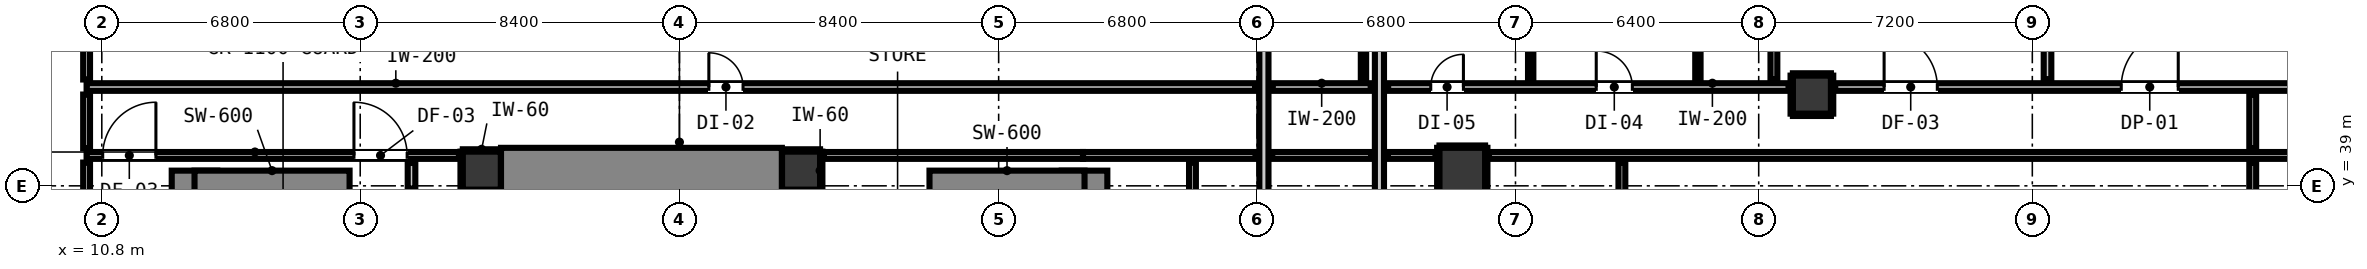
"""IFC4 building model, lengths in metres.
Left out: names, types, materials, properties, quantities, classifications, styles, units other than length and angle.
Written with IfcOpenShell. Run it as: python <this file> out.ifc"""

import sys

from ifc_helpers import new_model, si_unit, direction, frame, frame_2d, origin, origin_2d, place, context, subcontext, project, spatial, rectangle, circle, extrude, element, fill, save


model = new_model("IFC4")
c1 = context("Model", 3, precision=1e-05, world=origin(), true_north=direction((0.0, 1.0)))
c2 = subcontext(c1, "Body", "Model", "MODEL_VIEW")
j1 = project(units=[si_unit("LENGTHUNIT", "METRE"), si_unit("PLANEANGLEUNIT", "RADIAN")], contexts=[c1])
p1 = place(None, origin())
s1 = spatial("IfcSite", under=j1, at=p1, CompositionType="ELEMENT")
p2 = place(p1, origin())
s2 = spatial("IfcBuilding", under=s1, at=p2, CompositionType="ELEMENT")
p3 = place(p2, frame((0.0, 0.0, -4.4)))
s3 = spatial("IfcBuildingStorey", under=s2, at=p3, CompositionType="ELEMENT", Elevation=-4.4)
for number, where, z_axis, x_axis in (
    (1, (20.8, 39.4, 0.0), (0.0, 0.0, 1.0), (1.0, 0.0, 0.0)),
    (2, (29.2, 39.4, 0.0), (0.0, 0.0, 1.0), (1.0, 0.0, 0.0)),
):
    element("IfcColumn", number, at=place(p3, frame(where, z_axis=z_axis, x_axis=x_axis)), inside=s3, PredefinedType="COLUMN", context=c2, shape_type="SweptSolid", body=[
        extrude(rectangle(XDim=1.0, YDim=1.0, at=origin_2d()), origin(), (0.0, 0.0, 1.0), 4.4),
    ])
p4 = place(p3, frame((13.24, 31.205, 0.0), z_axis=(0.0, 0.0, 1.0), x_axis=(0.0, 1.0, 0.0)))
e3 = element("IfcWall", 3, at=p4, inside=s3, PredefinedType="SHEAR", context=c2, shape_type="SweptSolid", body=[
    extrude(rectangle(XDim=8.195, YDim=1.2, at=frame_2d((4.097, 0.0))), origin(), (0.0, 0.0, 1.0), 4.4),
])
p5 = place(p3, frame((13.24, 39.1, 0.0), z_axis=(0.0, 0.0, 1.0), x_axis=(1.0, 0.0, 0.0)))
e4 = element("IfcWall", 4, at=p5, inside=s3, PredefinedType="SHEAR", context=c2, shape_type="SweptSolid", body=[
    extrude(rectangle(XDim=4.08, YDim=0.6, at=frame_2d((2.04, 0.0))), origin(), (0.0, 0.0, 1.0), 4.4),
])
p6 = place(p3, frame((36.66, 31.205, 0.0), z_axis=(0.0, 0.0, 1.0), x_axis=(0.0, 1.0, 0.0)))
e5 = element("IfcWall", 5, at=p6, inside=s3, PredefinedType="SHEAR", context=c2, shape_type="SweptSolid", body=[
    extrude(rectangle(XDim=8.195, YDim=1.2, at=frame_2d((4.097, 0.0))), origin(), (0.0, 0.0, 1.0), 4.4),
])
p7 = place(p3, frame((32.58, 39.1, 0.0), z_axis=(0.0, 0.0, 1.0), x_axis=(1.0, 0.0, 0.0)))
e6 = element("IfcWall", 6, at=p7, inside=s3, PredefinedType="SHEAR", context=c2, shape_type="SweptSolid", body=[
    extrude(rectangle(XDim=4.08, YDim=0.6, at=frame_2d((2.04, 0.0))), origin(), (0.0, 0.0, 1.0), 4.4),
])
p8 = place(p3, frame((21.305, 39.4, 0.0), z_axis=(0.0, 0.0, 1.0), x_axis=(1.0, 0.0, 0.0)))
e7 = element("IfcWall", 7, at=p8, inside=s3, PredefinedType="SHEAR", context=c2, shape_type="SweptSolid", body=[
    extrude(rectangle(XDim=7.39, YDim=1.2, at=frame_2d((3.695, 0.0))), origin(), (0.0, 0.0, 1.0), 4.4),
])
p9 = place(p3, frame((46.6, 39.4, 0.0), z_axis=(0.0, 0.0, 1.0), x_axis=(1.0, 0.0, 0.0)))
e8 = element("IfcColumn", 8, at=p9, inside=s3, PredefinedType="COLUMN", context=c2, shape_type="SweptSolid", body=[
    extrude(circle(Radius=0.6, at=origin_2d()), origin(), (0.0, 0.0, 1.0), 4.4),
])
p10 = place(p3, frame((55.8, 41.4, 0.0), z_axis=(0.0, 0.0, 1.0), x_axis=(1.0, 0.0, 0.0)))
e9 = element("IfcColumn", 9, at=p10, inside=s3, PredefinedType="COLUMN", context=c2, shape_type="SweptSolid", body=[
    extrude(rectangle(XDim=1.0, YDim=1.0, at=origin_2d()), origin(), (0.0, 0.0, 1.0), 4.4),
])
for number, where, z_axis, x_axis in (
    (10, (41.38, 21.95, 0.0), (0.0, 0.0, 1.0), (0.0, 1.0, 0.0)),
    (11, (44.42, 21.95, 0.0), (0.0, 0.0, 1.0), (0.0, 1.0, 0.0)),
):
    element("IfcWall", number, at=place(p3, frame(where, z_axis=z_axis, x_axis=x_axis)), inside=s3, PredefinedType="PARAPET", context=c2, shape_type="SweptSolid", body=[
        extrude(rectangle(XDim=28.85, YDim=0.24, at=frame_2d((14.425, 0.0))), origin(), (0.0, 0.0, 1.0), 3.96),
    ])
p11 = place(p3, frame((10.4, 41.6, 0.0), z_axis=(0.0, 0.0, 1.0), x_axis=(1.0, 0.0, 0.0)))
e12 = element("IfcWall", 12, at=p11, inside=s3, PredefinedType="PARTITIONING", context=c2, shape_type="SweptSolid", body=[
    extrude(rectangle(XDim=30.752, YDim=0.2, at=frame_2d((15.376, 0.0))), origin(), (0.0, 0.0, 1.0), 3.98),
])
p12 = place(p11, frame((16.374, 0.0, 0.0)))
e13 = element("IfcOpeningElement", 13, at=p12, cuts=e12, PredefinedType="OPENING", context=c2, shape_type="SweptSolid", body=[
    extrude(rectangle(XDim=0.9, YDim=2.1, at=frame_2d((0.45, 1.05))), frame((0.0, 0.11, 0.0), z_axis=(0.0, -1.0, 0.0), x_axis=(1.0, 0.0, 0.0)), (0.0, 0.0, 1.0), 0.22),
])
p13 = place(p3, frame((41.608, 41.6, 0.0), z_axis=(0.0, 0.0, 1.0), x_axis=(1.0, 0.0, 0.0)))
e14 = element("IfcWall", 14, at=p13, inside=s3, PredefinedType="PARTITIONING", context=c2, shape_type="SweptSolid", body=[
    extrude(rectangle(XDim=2.584, YDim=0.2, at=frame_2d((1.292, 0.0))), origin(), (0.0, 0.0, 1.0), 3.98),
])
p14 = place(p3, frame((44.648, 41.6, 0.0), z_axis=(0.0, 0.0, 1.0), x_axis=(1.0, 0.0, 0.0)))
e15 = element("IfcWall", 15, at=p14, inside=s3, PredefinedType="PARTITIONING", context=c2, shape_type="SweptSolid", body=[
    extrude(rectangle(XDim=10.54, YDim=0.2, at=frame_2d((5.27, 0.0))), origin(), (0.0, 0.0, 1.0), 3.98),
])
p15 = place(p14, frame((1.122, 0.0, 0.0)))
e16 = element("IfcOpeningElement", 16, at=p15, cuts=e15, PredefinedType="OPENING", context=c2, shape_type="SweptSolid", body=[
    extrude(rectangle(XDim=0.86, YDim=2.02, at=frame_2d((0.43, 1.01))), frame((0.0, 0.11, 0.0), z_axis=(0.0, -1.0, 0.0), x_axis=(1.0, 0.0, 0.0)), (0.0, 0.0, 1.0), 0.22),
])
p16 = place(p14, frame((5.477, 0.0, 0.0)))
e17 = element("IfcOpeningElement", 17, at=p16, cuts=e15, PredefinedType="OPENING", context=c2, shape_type="SweptSolid", body=[
    extrude(rectangle(XDim=0.95, YDim=2.1, at=frame_2d((0.475, 1.05))), frame((0.0, 0.11, 0.0), z_axis=(0.0, -1.0, 0.0), x_axis=(1.0, 0.0, 0.0)), (0.0, 0.0, 1.0), 0.22),
])
p17 = place(p3, frame((56.412, 41.6, 0.0), z_axis=(0.0, 0.0, 1.0), x_axis=(1.0, 0.0, 0.0)))
e18 = element("IfcWall", 18, at=p17, inside=s3, PredefinedType="PARTITIONING", context=c2, shape_type="SweptSolid", body=[
    extrude(rectangle(XDim=24.776, YDim=0.2, at=frame_2d((12.388, 0.0))), origin(), (0.0, 0.0, 1.0), 3.153),
])
p18 = place(p17, frame((1.288, 0.0, 0.0)))
e19 = element("IfcOpeningElement", 19, at=p18, cuts=e18, PredefinedType="OPENING", context=c2, shape_type="SweptSolid", body=[
    extrude(rectangle(XDim=1.4, YDim=2.15, at=frame_2d((0.7, 1.075))), frame((0.0, 0.11, 0.0), z_axis=(0.0, -1.0, 0.0), x_axis=(1.0, 0.0, 0.0)), (0.0, 0.0, 1.0), 0.22),
])
p19 = place(p17, frame((7.528, 0.0, 0.0)))
e20 = element("IfcOpeningElement", 20, at=p19, cuts=e18, PredefinedType="OPENING", context=c2, shape_type="SweptSolid", body=[
    extrude(rectangle(XDim=1.5, YDim=2.15, at=frame_2d((0.75, 1.075))), frame((0.0, 0.11, 0.0), z_axis=(0.0, -1.0, 0.0), x_axis=(1.0, 0.0, 0.0)), (0.0, 0.0, 1.0), 0.22),
])
p20 = place(p3, frame((10.4, 39.8, 0.0), z_axis=(0.0, 0.0, 1.0), x_axis=(1.0, 0.0, 0.0)))
e21 = element("IfcWall", 21, at=p20, inside=s3, PredefinedType="PARTITIONING", context=c2, shape_type="SweptSolid", body=[
    extrude(rectangle(XDim=9.798, YDim=0.18, at=frame_2d((4.899, 0.0))), origin(), (0.0, 0.0, 1.0), 3.215),
])
p21 = place(p20, frame((7.035, 0.0, 0.0)))
e22 = element("IfcOpeningElement", 22, at=p21, cuts=e21, PredefinedType="OPENING", context=c2, shape_type="SweptSolid", body=[
    extrude(rectangle(XDim=1.4, YDim=2.15, at=frame_2d((0.7, 1.075))), frame((0.0, 0.1, 0.0), z_axis=(0.0, -1.0, 0.0), x_axis=(1.0, 0.0, 0.0)), (0.0, 0.0, 1.0), 0.2),
])
p22 = place(p20, frame((0.424, 0.0, 0.0)))
e23 = element("IfcOpeningElement", 23, at=p22, cuts=e21, PredefinedType="OPENING", context=c2, shape_type="SweptSolid", body=[
    extrude(rectangle(XDim=1.4, YDim=2.15, at=frame_2d((0.7, 1.075))), frame((0.0, 0.1, 0.0), z_axis=(0.0, -1.0, 0.0), x_axis=(1.0, 0.0, 0.0)), (0.0, 0.0, 1.0), 0.2),
])
p23 = place(p3, frame((29.802, 39.8, 0.0), z_axis=(0.0, 0.0, 1.0), x_axis=(1.0, 0.0, 0.0)))
e24 = element("IfcWall", 24, at=p23, inside=s3, PredefinedType="PARTITIONING", context=c2, shape_type="SweptSolid", body=[
    extrude(rectangle(XDim=6.818, YDim=0.18, at=frame_2d((3.409, 0.0))), origin(), (0.0, 0.0, 1.0), 3.98),
])
p24 = place(p3, frame((36.62, 39.8, 0.0), z_axis=(0.0, 0.0, 1.0), x_axis=(1.0, 0.0, 0.0)))
e25 = element("IfcWall", 25, at=p24, inside=s3, PredefinedType="PARTITIONING", context=c2, shape_type="SweptSolid", body=[
    extrude(rectangle(XDim=4.542, YDim=0.18, at=frame_2d((2.271, 0.0))), origin(), (0.0, 0.0, 1.0), 1.595),
])
p25 = place(p3, frame((41.598, 39.8, 0.0), z_axis=(0.0, 0.0, 1.0), x_axis=(1.0, 0.0, 0.0)))
e26 = element("IfcWall", 26, at=p25, inside=s3, PredefinedType="PARTITIONING", context=c2, shape_type="SweptSolid", body=[
    extrude(rectangle(XDim=2.604, YDim=0.18, at=frame_2d((1.302, 0.0))), origin(), (0.0, 0.0, 1.0), 1.595),
])
p26 = place(p3, frame((44.638, 39.8, 0.0), z_axis=(0.0, 0.0, 1.0), x_axis=(1.0, 0.0, 0.0)))
e27 = element("IfcWall", 27, at=p26, inside=s3, PredefinedType="PARTITIONING", context=c2, shape_type="SweptSolid", body=[
    extrude(rectangle(XDim=1.26, YDim=0.18, at=frame_2d((0.63, 0.0))), origin(), (0.0, 0.0, 1.0), 1.595),
])
p27 = place(p3, frame((47.302, 39.8, 0.0), z_axis=(0.0, 0.0, 1.0), x_axis=(1.0, 0.0, 0.0)))
e28 = element("IfcWall", 28, at=p27, inside=s3, PredefinedType="PARTITIONING", context=c2, shape_type="SweptSolid", body=[
    extrude(rectangle(XDim=23.098, YDim=0.18, at=frame_2d((11.549, 0.0))), origin(), (0.0, 0.0, 1.0), 3.98),
])
p28 = place(p3, frame((18.95, 38.928, 0.0), z_axis=(0.0, 0.0, 1.0), x_axis=(0.0, 1.0, 0.0)))
e29 = element("IfcWall", 29, at=p28, inside=s3, PredefinedType="PARTITIONING", context=c2, shape_type="SweptSolid", body=[
    extrude(rectangle(XDim=0.674, YDim=0.2, at=frame_2d((0.337, 0.0))), origin(), (0.0, 0.0, 1.0), 3.98),
])
p29 = place(p3, frame((62.0, 41.808, 0.0), z_axis=(0.0, 0.0, 1.0), x_axis=(0.0, 1.0, 0.0)))
e30 = element("IfcWall", 30, at=p29, inside=s3, PredefinedType="PARTITIONING", context=c2, shape_type="SweptSolid", body=[
    extrude(rectangle(XDim=2.442, YDim=0.2, at=frame_2d((1.221, 0.0))), origin(), (0.0, 0.0, 1.0), 3.98),
])
p30 = place(p3, frame((10.4, 21.818, 0.0), z_axis=(0.0, 0.0, 1.0), x_axis=(0.0, 1.0, 0.0)))
e31 = element("IfcWall", 31, at=p30, inside=s3, PredefinedType="PARTITIONING", context=c2, shape_type="SweptSolid", body=[
    extrude(rectangle(XDim=17.794, YDim=0.18, at=frame_2d((8.897, 0.0))), origin(), (0.0, 0.0, 1.0), 3.98),
])
p31 = place(p3, frame((10.4, 39.988, 0.0), z_axis=(0.0, 0.0, 1.0), x_axis=(0.0, 1.0, 0.0)))
e32 = element("IfcWall", 32, at=p31, inside=s3, PredefinedType="PARTITIONING", context=c2, shape_type="SweptSolid", body=[
    extrude(rectangle(XDim=1.414, YDim=0.18, at=frame_2d((0.707, 0.0))), origin(), (0.0, 0.0, 1.0), 3.98),
])
p32 = place(p3, frame((10.4, 41.798, 0.0), z_axis=(0.0, 0.0, 1.0), x_axis=(0.0, 1.0, 0.0)))
e33 = element("IfcWall", 33, at=p32, inside=s3, PredefinedType="PARTITIONING", context=c2, shape_type="SweptSolid", body=[
    extrude(rectangle(XDim=15.844, YDim=0.18, at=frame_2d((7.922, 0.0))), origin(), (0.0, 0.0, 1.0), 3.98),
])
p33 = place(p3, frame((39.5, 21.818, 0.0), z_axis=(0.0, 0.0, 1.0), x_axis=(0.0, 1.0, 0.0)))
e34 = element("IfcWall", 34, at=p33, inside=s3, PredefinedType="PARTITIONING", context=c2, shape_type="SweptSolid", body=[
    extrude(rectangle(XDim=17.794, YDim=0.18, at=frame_2d((8.897, 0.0))), origin(), (0.0, 0.0, 1.0), 3.98),
])
p34 = place(p3, frame((50.8, 36.798, 0.0), z_axis=(0.0, 0.0, 1.0), x_axis=(0.0, 1.0, 0.0)))
e35 = element("IfcWall", 35, at=p34, inside=s3, PredefinedType="PARTITIONING", context=c2, shape_type="SweptSolid", body=[
    extrude(rectangle(XDim=2.814, YDim=0.18, at=frame_2d((1.407, 0.0))), origin(), (0.0, 0.0, 1.0), 3.98),
])
p35 = place(p3, frame((54.8, 41.798, 0.0), z_axis=(0.0, 0.0, 1.0), x_axis=(0.0, 1.0, 0.0)))
e36 = element("IfcWall", 36, at=p35, inside=s3, PredefinedType="PARTITIONING", context=c2, shape_type="SweptSolid", body=[
    extrude(rectangle(XDim=2.534, YDim=0.18, at=frame_2d((1.267, 0.0))), origin(), (0.0, 0.0, 1.0), 3.98),
])
p36 = place(p3, frame((67.4, 21.818, 0.0), z_axis=(0.0, 0.0, 1.0), x_axis=(0.0, 1.0, 0.0)))
e37 = element("IfcWall", 37, at=p36, inside=s3, PredefinedType="PARTITIONING", context=c2, shape_type="SweptSolid", body=[
    extrude(rectangle(XDim=17.794, YDim=0.18, at=frame_2d((8.897, 0.0))), origin(), (0.0, 0.0, 1.0), 3.98),
])
p37 = place(p3, frame((67.4, 39.988, 0.0), z_axis=(0.0, 0.0, 1.0), x_axis=(0.0, 1.0, 0.0)))
e38 = element("IfcWall", 38, at=p37, inside=s3, PredefinedType="PARTITIONING", context=c2, shape_type="SweptSolid", body=[
    extrude(rectangle(XDim=1.414, YDim=0.18, at=frame_2d((0.707, 0.0))), origin(), (0.0, 0.0, 1.0), 3.98),
])
p38 = place(p3, frame((44.0, 41.778, 0.0), z_axis=(0.0, 0.0, 1.0), x_axis=(0.0, 1.0, 0.0)))
e39 = element("IfcWall", 39, at=p38, inside=s3, PredefinedType="PARTITIONING", context=c2, shape_type="SweptSolid", body=[
    extrude(rectangle(XDim=15.884, YDim=0.14, at=frame_2d((7.942, 0.0))), origin(), (0.0, 0.0, 1.0), 3.98),
])
for number, where, z_axis, x_axis in (
    (40, (48.4, 41.778, 0.0), (0.0, 0.0, 1.0), (0.0, 1.0, 0.0)),
    (41, (52.8, 41.778, 0.0), (0.0, 0.0, 1.0), (0.0, 1.0, 0.0)),
):
    element("IfcWall", number, at=place(p3, frame(where, z_axis=z_axis, x_axis=x_axis)), inside=s3, PredefinedType="PARTITIONING", context=c2, shape_type="SweptSolid", body=[
        extrude(rectangle(XDim=4.274, YDim=0.14, at=frame_2d((2.137, 0.0))), origin(), (0.0, 0.0, 1.0), 3.98),
    ])
for number, where, z_axis, x_axis in (
    (42, (20.3, 38.868, 0.0), (0.0, 0.0, 1.0), (1.0, 0.0, 0.0)),
    (43, (20.3, 39.932, 0.0), (0.0, 0.0, 1.0), (1.0, 0.0, 0.0)),
):
    element("IfcWall", number, at=place(p3, frame(where, z_axis=z_axis, x_axis=x_axis)), inside=s3, PredefinedType="PARTITIONING", context=c2, shape_type="SweptSolid", body=[
        extrude(rectangle(XDim=0.99, YDim=0.06, at=frame_2d((0.495, 0.0))), origin(), (0.0, 0.0, 1.0), 1.45),
    ])
p39 = place(p3, frame((20.268, 38.9, 0.0), z_axis=(0.0, 0.0, 1.0), x_axis=(0.0, 1.0, 0.0)))
e44 = element("IfcWall", 44, at=p39, inside=s3, PredefinedType="PARTITIONING", context=c2, shape_type="SweptSolid", body=[
    extrude(rectangle(XDim=1.0, YDim=0.06, at=frame_2d((0.5, 0.0))), origin(), (0.0, 0.0, 1.0), 1.45),
])
for number, where, z_axis, x_axis in (
    (45, (28.71, 38.868, 0.0), (0.0, 0.0, 1.0), (1.0, 0.0, 0.0)),
    (46, (28.71, 39.932, 0.0), (0.0, 0.0, 1.0), (1.0, 0.0, 0.0)),
):
    element("IfcWall", number, at=place(p3, frame(where, z_axis=z_axis, x_axis=x_axis)), inside=s3, PredefinedType="PARTITIONING", context=c2, shape_type="SweptSolid", body=[
        extrude(rectangle(XDim=0.99, YDim=0.06, at=frame_2d((0.495, 0.0))), origin(), (0.0, 0.0, 1.0), 1.45),
    ])
p40 = place(p3, frame((29.732, 38.9, 0.0), z_axis=(0.0, 0.0, 1.0), x_axis=(0.0, 1.0, 0.0)))
e47 = element("IfcWall", 47, at=p40, inside=s3, PredefinedType="PARTITIONING", context=c2, shape_type="SweptSolid", body=[
    extrude(rectangle(XDim=1.0, YDim=0.06, at=frame_2d((0.5, 0.0))), origin(), (0.0, 0.0, 1.0), 1.45),
])
for number, where, z_axis, x_axis in (
    (48, (46.0, 40.032, 0.0), (0.0, 0.0, 1.0), (1.0, 0.0, 0.0)),
    (49, (45.968, 38.8, 0.0), (0.0, 0.0, 1.0), (0.0, 1.0, 0.0)),
    (50, (47.232, 38.8, 0.0), (0.0, 0.0, 1.0), (0.0, 1.0, 0.0)),
):
    element("IfcWall", number, at=place(p3, frame(where, z_axis=z_axis, x_axis=x_axis)), inside=s3, PredefinedType="PARTITIONING", context=c2, shape_type="SweptSolid", body=[
        extrude(rectangle(XDim=1.2, YDim=0.06, at=frame_2d((0.6, 0.0))), origin(), (0.0, 0.0, 1.0), 1.45),
    ])
for number, where, z_axis, x_axis in (
    (51, (55.3, 40.868, 0.0), (0.0, 0.0, 1.0), (1.0, 0.0, 0.0)),
    (52, (55.3, 41.932, 0.0), (0.0, 0.0, 1.0), (1.0, 0.0, 0.0)),
    (53, (55.268, 40.9, 0.0), (0.0, 0.0, 1.0), (0.0, 1.0, 0.0)),
    (54, (56.332, 40.9, 0.0), (0.0, 0.0, 1.0), (0.0, 1.0, 0.0)),
):
    element("IfcWall", number, at=place(p3, frame(where, z_axis=z_axis, x_axis=x_axis)), inside=s3, PredefinedType="PARTITIONING", context=c2, shape_type="SweptSolid", body=[
        extrude(rectangle(XDim=1.0, YDim=0.06, at=frame_2d((0.5, 0.0))), origin(), (0.0, 0.0, 1.0), 1.45),
    ])
p41 = place(p21, origin())
e55 = element("IfcDoor", 55, at=p41, inside=s3, OperationType="SINGLE_SWING_LEFT", PredefinedType="DOOR", context=c2, shape_type="SweptSolid", body=[
    extrude(rectangle(XDim=1.4, YDim=2.15, at=frame_2d((0.7, 1.075))), frame((0.0, 0.025, 0.0), z_axis=(0.0, -1.0, 0.0), x_axis=(1.0, 0.0, 0.0)), (0.0, 0.0, 1.0), 0.05),
])
fill(e22, e55)
p42 = place(p22, origin())
e56 = element("IfcDoor", 56, at=p42, inside=s3, OperationType="SINGLE_SWING_RIGHT", PredefinedType="DOOR", context=c2, shape_type="SweptSolid", body=[
    extrude(rectangle(XDim=1.4, YDim=2.15, at=frame_2d((0.7, 1.075))), frame((0.0, 0.025, 0.0), z_axis=(0.0, -1.0, 0.0), x_axis=(1.0, 0.0, 0.0)), (0.0, 0.0, 1.0), 0.05),
])
fill(e23, e56)
p43 = place(p18, origin())
e57 = element("IfcDoor", 57, at=p43, inside=s3, OperationType="SINGLE_SWING_LEFT", PredefinedType="DOOR", context=c2, shape_type="SweptSolid", body=[
    extrude(rectangle(XDim=1.4, YDim=2.15, at=frame_2d((0.7, 1.075))), frame((0.0, 0.025, 0.0), z_axis=(0.0, -1.0, 0.0), x_axis=(1.0, 0.0, 0.0)), (0.0, 0.0, 1.0), 0.05),
])
fill(e19, e57)
p44 = place(p12, origin())
e58 = element("IfcDoor", 58, at=p44, inside=s3, OperationType="SINGLE_SWING_LEFT", PredefinedType="DOOR", context=c2, shape_type="SweptSolid", body=[
    extrude(rectangle(XDim=0.9, YDim=2.1, at=frame_2d((0.45, 1.05))), frame((0.0, 0.025, 0.0), z_axis=(0.0, -1.0, 0.0), x_axis=(1.0, 0.0, 0.0)), (0.0, 0.0, 1.0), 0.05),
])
fill(e13, e58)
p45 = place(p15, origin())
e59 = element("IfcDoor", 59, at=p45, inside=s3, OperationType="SINGLE_SWING_RIGHT", PredefinedType="DOOR", context=c2, shape_type="SweptSolid", body=[
    extrude(rectangle(XDim=0.86, YDim=2.02, at=frame_2d((0.43, 1.01))), frame((0.0, 0.025, 0.0), z_axis=(0.0, -1.0, 0.0), x_axis=(1.0, 0.0, 0.0)), (0.0, 0.0, 1.0), 0.05),
])
fill(e16, e59)
p46 = place(p16, origin())
e60 = element("IfcDoor", 60, at=p46, inside=s3, OperationType="SINGLE_SWING_LEFT", PredefinedType="DOOR", context=c2, shape_type="SweptSolid", body=[
    extrude(rectangle(XDim=0.95, YDim=2.1, at=frame_2d((0.475, 1.05))), frame((0.0, 0.025, 0.0), z_axis=(0.0, -1.0, 0.0), x_axis=(1.0, 0.0, 0.0)), (0.0, 0.0, 1.0), 0.05),
])
fill(e17, e60)
p47 = place(p19, origin())
e61 = element("IfcDoor", 61, at=p47, inside=s3, OperationType="SINGLE_SWING_RIGHT", PredefinedType="DOOR", context=c2, shape_type="SweptSolid", body=[
    extrude(rectangle(XDim=1.5, YDim=2.15, at=frame_2d((0.75, 1.075))), frame((0.0, 0.025, 0.0), z_axis=(0.0, -1.0, 0.0), x_axis=(1.0, 0.0, 0.0)), (0.0, 0.0, 1.0), 0.05),
])
fill(e20, e61)
save(model, sys.argv[1])
